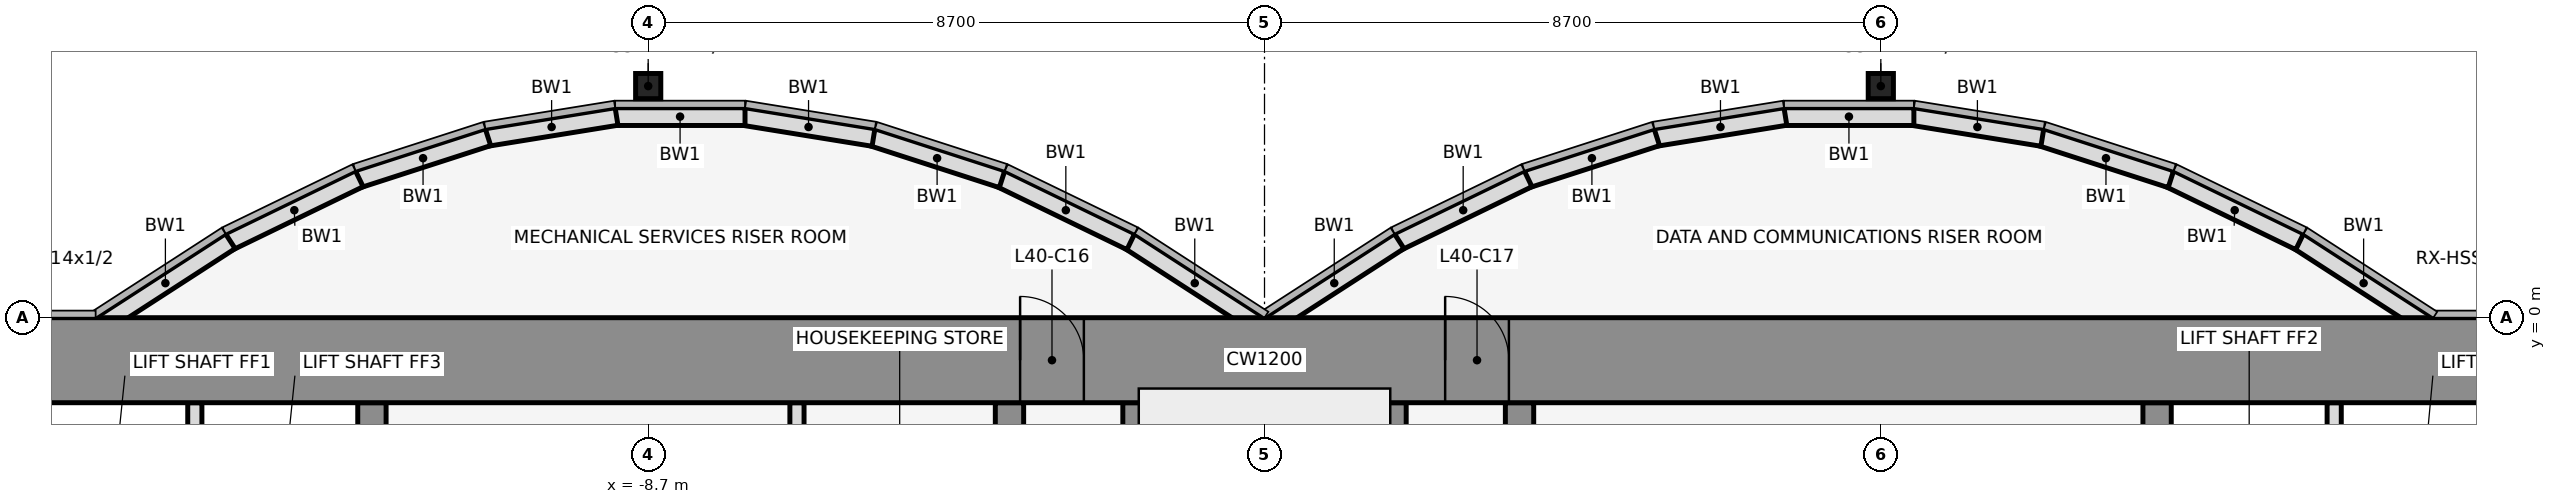
"""IFC4 building model, lengths in metres.
Left out: names, types, materials, properties, quantities, classifications, styles, units other than length and angle.
Written with IfcOpenShell. Run it as: python <this file> out.ifc"""

import sys

from ifc_helpers import new_model, si_unit, direction, frame, frame_2d, origin, origin_2d, place, context, subcontext, project, spatial, rectangle, hollow_rectangle, extrude, element, fill, save


model = new_model("IFC4")
c1 = context("Model", 3, precision=1e-05, world=origin(), true_north=direction((0.0, 1.0)))
c2 = subcontext(c1, "Body", "Model", "MODEL_VIEW")
j1 = project(units=[si_unit("LENGTHUNIT", "METRE"), si_unit("PLANEANGLEUNIT", "RADIAN")], contexts=[c1])
p1 = place(None, origin())
s1 = spatial("IfcSite", under=j1, at=p1, CompositionType="ELEMENT")
p2 = place(p1, origin())
s2 = spatial("IfcBuilding", under=s1, at=p2, CompositionType="ELEMENT")
p3 = place(p2, frame((0.0, 0.0, 181.4)))
s3 = spatial("IfcBuildingStorey", under=s2, at=p3, CompositionType="ELEMENT", Elevation=181.4)
for number, where, z_axis, x_axis in (
    (1, (-8.7, 3.269, 0.0), (0.0, 0.0, 1.0), (1.0, 0.0, 0.0)),
    (2, (8.7, 3.269, 0.0), (0.0, 0.0, 1.0), (1.0, 0.0, 0.0)),
):
    element("IfcColumn", number, at=place(p3, frame(where, z_axis=z_axis, x_axis=x_axis)), inside=s3, PredefinedType="COLUMN", context=c2, shape_type="SweptSolid", body=[
        extrude(hollow_rectangle(XDim=0.356, YDim=0.356, WallThickness=0.012, at=origin_2d()), origin(), (0.0, 0.0, 1.0), 4.1),
    ])
p4 = place(p3, frame((16.432, -0.105, 0.0), z_axis=(0.0, 0.0, 1.0), x_axis=(-0.83981312244, 0.542875602121, 0.0)))
e3 = element("IfcWall", 3, at=p4, inside=s3, PredefinedType="STANDARD", context=c2, shape_type="SweptSolid", body=[
    extrude(rectangle(XDim=2.183, YDim=0.25, at=frame_2d((1.091, 0.0))), origin(), (0.0, 0.0, 1.0), 3.9),
])
p5 = place(p3, frame((14.612, 1.073, 0.0), z_axis=(0.0, 0.0, 1.0), x_axis=(-0.89982408427, 0.436252928206, 0.0)))
e4 = element("IfcWall", 4, at=p5, inside=s3, PredefinedType="STANDARD", context=c2, shape_type="SweptSolid", body=[
    extrude(rectangle(XDim=2.038, YDim=0.25, at=frame_2d((1.019, 0.0))), origin(), (0.0, 0.0, 1.0), 3.9),
])
p6 = place(p3, frame((12.795, 1.955, 0.0), z_axis=(0.0, 0.0, 1.0), x_axis=(-0.951495806175, 0.307661714928, 0.0)))
e5 = element("IfcWall", 5, at=p6, inside=s3, PredefinedType="STANDARD", context=c2, shape_type="SweptSolid", body=[
    extrude(rectangle(XDim=1.927, YDim=0.25, at=frame_2d((0.963, 0.0))), origin(), (0.0, 0.0, 1.0), 3.9),
])
p7 = place(p3, frame((10.98, 2.543, 0.0), z_axis=(0.0, 0.0, 1.0), x_axis=(-0.987181718931, 0.159600293885, 0.0)))
e6 = element("IfcWall", 6, at=p7, inside=s3, PredefinedType="STANDARD", context=c2, shape_type="SweptSolid", body=[
    extrude(rectangle(XDim=1.857, YDim=0.25, at=frame_2d((0.929, 0.0))), origin(), (0.0, 0.0, 1.0), 3.9),
])
p8 = place(p3, frame((9.167, 2.838, 0.0), z_axis=(0.0, 0.0, 1.0), x_axis=(-1.0, 0.0, 0.0)))
e7 = element("IfcWall", 7, at=p8, inside=s3, PredefinedType="STANDARD", context=c2, shape_type="SweptSolid", body=[
    extrude(rectangle(XDim=1.833, YDim=0.25, at=frame_2d((0.917, 0.0))), origin(), (0.0, 0.0, 1.0), 3.9),
])
p9 = place(p3, frame((7.353, 2.84, 0.0), z_axis=(0.0, 0.0, 1.0), x_axis=(-0.987181718931, -0.159600293885, 0.0)))
e8 = element("IfcWall", 8, at=p9, inside=s3, PredefinedType="STANDARD", context=c2, shape_type="SweptSolid", body=[
    extrude(rectangle(XDim=1.857, YDim=0.25, at=frame_2d((0.929, 0.0))), origin(), (0.0, 0.0, 1.0), 3.9),
])
p10 = place(p3, frame((5.538, 2.548, 0.0), z_axis=(0.0, 0.0, 1.0), x_axis=(-0.951495806175, -0.307661714928, 0.0)))
e9 = element("IfcWall", 9, at=p10, inside=s3, PredefinedType="STANDARD", context=c2, shape_type="SweptSolid", body=[
    extrude(rectangle(XDim=1.927, YDim=0.25, at=frame_2d((0.963, 0.0))), origin(), (0.0, 0.0, 1.0), 3.9),
])
p11 = place(p3, frame((3.721, 1.962, 0.0), z_axis=(0.0, 0.0, 1.0), x_axis=(-0.89982408427, -0.436252928206, 0.0)))
e10 = element("IfcWall", 10, at=p11, inside=s3, PredefinedType="STANDARD", context=c2, shape_type="SweptSolid", body=[
    extrude(rectangle(XDim=2.038, YDim=0.25, at=frame_2d((1.019, 0.0))), origin(), (0.0, 0.0, 1.0), 3.9),
])
for number, where, z_axis, x_axis in (
    (11, (1.901, 1.08, 0.0), (0.0, 0.0, 1.0), (-0.84, -0.543, 0.0)),
    (12, (-0.068, -0.105, 0.0), (0.0, 0.0, 1.0), (-0.84, 0.543, 0.0)),
):
    element("IfcWall", number, at=place(p3, frame(where, z_axis=z_axis, x_axis=x_axis)), inside=s3, PredefinedType="STANDARD", context=c2, shape_type="SweptSolid", body=[
        extrude(rectangle(XDim=2.183, YDim=0.25, at=frame_2d((1.091, 0.0))), origin(), (0.0, 0.0, 1.0), 3.9),
    ])
p12 = place(p3, frame((-1.888, 1.073, 0.0), z_axis=(0.0, 0.0, 1.0), x_axis=(-0.89982408427, 0.436252928206, 0.0)))
e13 = element("IfcWall", 13, at=p12, inside=s3, PredefinedType="STANDARD", context=c2, shape_type="SweptSolid", body=[
    extrude(rectangle(XDim=2.038, YDim=0.25, at=frame_2d((1.019, 0.0))), origin(), (0.0, 0.0, 1.0), 3.9),
])
p13 = place(p3, frame((-3.705, 1.955, 0.0), z_axis=(0.0, 0.0, 1.0), x_axis=(-0.951495806175, 0.307661714928, 0.0)))
e14 = element("IfcWall", 14, at=p13, inside=s3, PredefinedType="STANDARD", context=c2, shape_type="SweptSolid", body=[
    extrude(rectangle(XDim=1.927, YDim=0.25, at=frame_2d((0.963, 0.0))), origin(), (0.0, 0.0, 1.0), 3.9),
])
p14 = place(p3, frame((-5.52, 2.543, 0.0), z_axis=(0.0, 0.0, 1.0), x_axis=(-0.987181718931, 0.159600293885, 0.0)))
e15 = element("IfcWall", 15, at=p14, inside=s3, PredefinedType="STANDARD", context=c2, shape_type="SweptSolid", body=[
    extrude(rectangle(XDim=1.857, YDim=0.25, at=frame_2d((0.929, 0.0))), origin(), (0.0, 0.0, 1.0), 3.9),
])
p15 = place(p3, frame((-7.333, 2.838, 0.0), z_axis=(0.0, 0.0, 1.0), x_axis=(-1.0, 0.0, 0.0)))
e16 = element("IfcWall", 16, at=p15, inside=s3, PredefinedType="STANDARD", context=c2, shape_type="SweptSolid", body=[
    extrude(rectangle(XDim=1.833, YDim=0.25, at=frame_2d((0.917, 0.0))), origin(), (0.0, 0.0, 1.0), 3.9),
])
p16 = place(p3, frame((-9.147, 2.84, 0.0), z_axis=(0.0, 0.0, 1.0), x_axis=(-0.987181718931, -0.159600293885, 0.0)))
e17 = element("IfcWall", 17, at=p16, inside=s3, PredefinedType="STANDARD", context=c2, shape_type="SweptSolid", body=[
    extrude(rectangle(XDim=1.857, YDim=0.25, at=frame_2d((0.929, 0.0))), origin(), (0.0, 0.0, 1.0), 3.9),
])
p17 = place(p3, frame((-10.962, 2.548, 0.0), z_axis=(0.0, 0.0, 1.0), x_axis=(-0.951495806175, -0.307661714928, 0.0)))
e18 = element("IfcWall", 18, at=p17, inside=s3, PredefinedType="STANDARD", context=c2, shape_type="SweptSolid", body=[
    extrude(rectangle(XDim=1.927, YDim=0.25, at=frame_2d((0.963, 0.0))), origin(), (0.0, 0.0, 1.0), 3.9),
])
p18 = place(p3, frame((-12.779, 1.962, 0.0), z_axis=(0.0, 0.0, 1.0), x_axis=(-0.89982408427, -0.436252928206, 0.0)))
e19 = element("IfcWall", 19, at=p18, inside=s3, PredefinedType="STANDARD", context=c2, shape_type="SweptSolid", body=[
    extrude(rectangle(XDim=2.038, YDim=0.25, at=frame_2d((1.019, 0.0))), origin(), (0.0, 0.0, 1.0), 3.9),
])
p19 = place(p3, frame((-14.599, 1.08, 0.0), z_axis=(0.0, 0.0, 1.0), x_axis=(-0.83981312244, -0.542875602121, 0.0)))
e20 = element("IfcWall", 20, at=p19, inside=s3, PredefinedType="STANDARD", context=c2, shape_type="SweptSolid", body=[
    extrude(rectangle(XDim=2.183, YDim=0.25, at=frame_2d((1.091, 0.0))), origin(), (0.0, 0.0, 1.0), 3.9),
])
p20 = place(p3, frame((-15.1, -4.6, 0.0), z_axis=(0.0, 0.0, 1.0), x_axis=(0.0, 1.0, 0.0)))
e21 = element("IfcWall", 21, at=p20, inside=s3, PredefinedType="PARTITIONING", context=c2, shape_type="SweptSolid", body=[
    extrude(rectangle(XDim=3.4, YDim=0.2, at=frame_2d((1.7, 0.0))), origin(), (0.0, 0.0, 1.0), 2.79),
])
p21 = place(p3, frame((-12.6, -11.8, 0.0), z_axis=(0.0, 0.0, 1.0), x_axis=(0.0, 1.0, 0.0)))
e22 = element("IfcWall", 22, at=p21, inside=s3, PredefinedType="SHEAR", context=c2, shape_type="SweptSolid", body=[
    extrude(rectangle(XDim=10.6, YDim=0.4, at=frame_2d((5.3, 0.0))), origin(), (0.0, 0.0, 1.0), 4.1),
])
p22 = place(p21, frame((4.75, 0.0, 0.0)))
e23 = element("IfcOpeningElement", 23, at=p22, cuts=e22, PredefinedType="OPENING", context=c2, shape_type="SweptSolid", body=[
    extrude(rectangle(XDim=1.1, YDim=2.1, at=frame_2d((0.55, 1.05))), frame((0.0, 0.212, 0.0), z_axis=(0.0, -1.0, 0.0), x_axis=(1.0, 0.0, 0.0)), (0.0, 0.0, 1.0), 0.424),
])
p23 = place(p3, frame((-6.6, -4.6, 0.0), z_axis=(0.0, 0.0, 1.0), x_axis=(0.0, 1.0, 0.0)))
e24 = element("IfcWall", 24, at=p23, inside=s3, PredefinedType="PARTITIONING", context=c2, shape_type="SweptSolid", body=[
    extrude(rectangle(XDim=3.4, YDim=0.2, at=frame_2d((1.7, 0.0))), origin(), (0.0, 0.0, 1.0), 2.79),
])
p24 = place(p3, frame((-3.6, -11.8, 0.0), z_axis=(0.0, 0.0, 1.0), x_axis=(0.0, 1.0, 0.0)))
e25 = element("IfcWall", 25, at=p24, inside=s3, PredefinedType="SHEAR", context=c2, shape_type="SweptSolid", body=[
    extrude(rectangle(XDim=10.6, YDim=0.4, at=frame_2d((5.3, 0.0))), origin(), (0.0, 0.0, 1.0), 4.1),
])
p25 = place(p24, frame((4.85, 0.0, 0.0)))
e26 = element("IfcOpeningElement", 26, at=p25, cuts=e25, PredefinedType="OPENING", context=c2, shape_type="SweptSolid", body=[
    extrude(rectangle(XDim=0.9, YDim=2.1, at=frame_2d((0.45, 1.05))), frame((0.0, 0.212, 0.0), z_axis=(0.0, -1.0, 0.0), x_axis=(1.0, 0.0, 0.0)), (0.0, 0.0, 1.0), 0.424),
])
for number, where, z_axis, x_axis in (
    (27, (-1.8, -11.8, 0.0), (0.0, 0.0, 1.0), (0.0, 1.0, 0.0)),
    (28, (1.8, -11.8, 0.0), (0.0, 0.0, 1.0), (0.0, 1.0, 0.0)),
):
    element("IfcWall", number, at=place(p3, frame(where, z_axis=z_axis, x_axis=x_axis)), inside=s3, PredefinedType="SHEAR", context=c2, shape_type="SweptSolid", body=[
        extrude(rectangle(XDim=10.6, YDim=0.4, at=frame_2d((5.3, 0.0))), origin(), (0.0, 0.0, 1.0), 4.1),
    ])
p26 = place(p3, frame((3.6, -11.8, 0.0), z_axis=(0.0, 0.0, 1.0), x_axis=(0.0, 1.0, 0.0)))
e29 = element("IfcWall", 29, at=p26, inside=s3, PredefinedType="SHEAR", context=c2, shape_type="SweptSolid", body=[
    extrude(rectangle(XDim=10.6, YDim=0.4, at=frame_2d((5.3, 0.0))), origin(), (0.0, 0.0, 1.0), 4.1),
])
p27 = place(p26, frame((1.35, 0.0, 0.0)))
e30 = element("IfcOpeningElement", 30, at=p27, cuts=e29, PredefinedType="OPENING", context=c2, shape_type="SweptSolid", body=[
    extrude(rectangle(XDim=0.9, YDim=2.1, at=frame_2d((0.45, 1.05))), frame((0.0, 0.212, 0.0), z_axis=(0.0, -1.0, 0.0), x_axis=(1.0, 0.0, 0.0)), (0.0, 0.0, 1.0), 0.424),
])
p28 = place(p3, frame((12.6, -11.8, 0.0), z_axis=(0.0, 0.0, 1.0), x_axis=(0.0, 1.0, 0.0)))
e31 = element("IfcWall", 31, at=p28, inside=s3, PredefinedType="SHEAR", context=c2, shape_type="SweptSolid", body=[
    extrude(rectangle(XDim=10.6, YDim=0.4, at=frame_2d((5.3, 0.0))), origin(), (0.0, 0.0, 1.0), 4.1),
])
p29 = place(p28, frame((1.25, 0.0, 0.0)))
e32 = element("IfcOpeningElement", 32, at=p29, cuts=e31, PredefinedType="OPENING", context=c2, shape_type="SweptSolid", body=[
    extrude(rectangle(XDim=1.2, YDim=2.1, at=frame_2d((0.6, 1.05))), frame((0.0, 0.212, 0.0), z_axis=(0.0, -1.0, 0.0), x_axis=(1.0, 0.0, 0.0)), (0.0, 0.0, 1.0), 0.424),
])
p30 = place(p28, frame((4.75, 0.0, 0.0)))
e33 = element("IfcOpeningElement", 33, at=p30, cuts=e31, PredefinedType="OPENING", context=c2, shape_type="SweptSolid", body=[
    extrude(rectangle(XDim=1.1, YDim=2.1, at=frame_2d((0.55, 1.05))), frame((0.0, 0.212, 0.0), z_axis=(0.0, -1.0, 0.0), x_axis=(1.0, 0.0, 0.0)), (0.0, 0.0, 1.0), 0.424),
])
p31 = place(p3, frame((15.1, -4.6, 0.0), z_axis=(0.0, 0.0, 1.0), x_axis=(0.0, 1.0, 0.0)))
e34 = element("IfcWall", 34, at=p31, inside=s3, PredefinedType="PARTITIONING", context=c2, shape_type="SweptSolid", body=[
    extrude(rectangle(XDim=3.4, YDim=0.2, at=frame_2d((1.7, 0.0))), origin(), (0.0, 0.0, 1.0), 2.79),
])
p32 = place(p3, frame((-22.0, -0.6, 0.0), z_axis=(0.0, 0.0, 1.0), x_axis=(1.0, 0.0, 0.0)))
e35 = element("IfcWall", 35, at=p32, inside=s3, PredefinedType="SHEAR", context=c2, shape_type="SweptSolid", body=[
    extrude(rectangle(XDim=44.0, YDim=1.2, at=frame_2d((22.0, 0.0))), origin(), (0.0, 0.0, 1.0), 4.1),
])
p33 = place(p32, frame((18.55, 0.0, 0.0)))
e36 = element("IfcOpeningElement", 36, at=p33, cuts=e35, PredefinedType="OPENING", context=c2, shape_type="SweptSolid", body=[
    extrude(rectangle(XDim=0.9, YDim=2.1, at=frame_2d((0.45, 1.05))), frame((0.0, 0.612, 0.0), z_axis=(0.0, -1.0, 0.0), x_axis=(1.0, 0.0, 0.0)), (0.0, 0.0, 1.0), 1.224),
])
p34 = place(p32, frame((24.55, 0.0, 0.0)))
e37 = element("IfcOpeningElement", 37, at=p34, cuts=e35, PredefinedType="OPENING", context=c2, shape_type="SweptSolid", body=[
    extrude(rectangle(XDim=0.9, YDim=2.1, at=frame_2d((0.45, 1.05))), frame((0.0, 0.612, 0.0), z_axis=(0.0, -1.0, 0.0), x_axis=(1.0, 0.0, 0.0)), (0.0, 0.0, 1.0), 1.224),
])
p35 = place(p33, origin())
e38 = element("IfcDoor", 38, at=p35, inside=s3, OperationType="SINGLE_SWING_LEFT", PredefinedType="DOOR", context=c2, shape_type="SweptSolid", body=[
    extrude(rectangle(XDim=0.9, YDim=2.1, at=frame_2d((0.45, 1.05))), frame((0.0, 0.025, 0.0), z_axis=(0.0, -1.0, 0.0), x_axis=(1.0, 0.0, 0.0)), (0.0, 0.0, 1.0), 0.05),
])
fill(e36, e38)
p36 = place(p34, origin())
e39 = element("IfcDoor", 39, at=p36, inside=s3, OperationType="SINGLE_SWING_LEFT", PredefinedType="DOOR", context=c2, shape_type="SweptSolid", body=[
    extrude(rectangle(XDim=0.9, YDim=2.1, at=frame_2d((0.45, 1.05))), frame((0.0, 0.025, 0.0), z_axis=(0.0, -1.0, 0.0), x_axis=(1.0, 0.0, 0.0)), (0.0, 0.0, 1.0), 0.05),
])
fill(e37, e39)
save(model, sys.argv[1])
